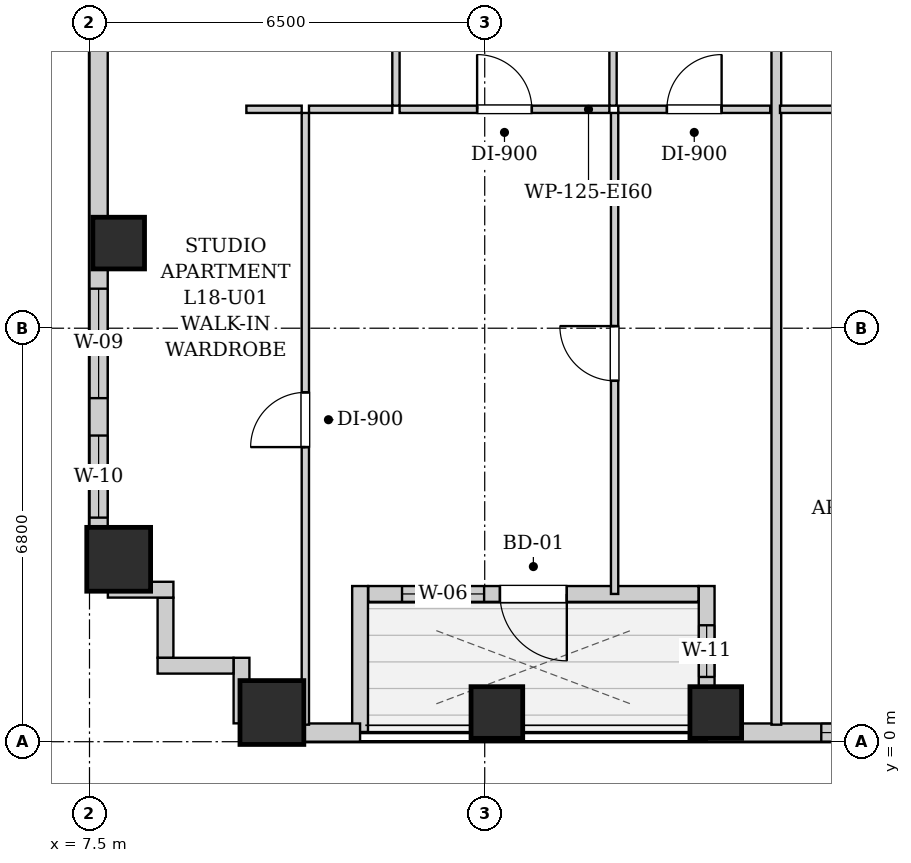
"""IFC4 building model, lengths in metres.
Left out: names, types, materials, properties, quantities, classifications, styles, units other than length and angle.
Written with IfcOpenShell. Run it as: python <this file> out.ifc"""

import sys

from ifc_helpers import new_model, si_unit, direction, frame, frame_2d, origin, origin_2d, place, context, subcontext, project, spatial, rectangle, extrude, element, fill, save


model = new_model("IFC4")
c1 = context("Model", 3, precision=1e-05, world=origin(), true_north=direction((0.0, 1.0)))
c2 = subcontext(c1, "Body", "Model", "MODEL_VIEW")
j1 = project(units=[si_unit("LENGTHUNIT", "METRE"), si_unit("PLANEANGLEUNIT", "RADIAN")], contexts=[c1])
p1 = place(None, origin())
s1 = spatial("IfcSite", under=j1, at=p1, CompositionType="ELEMENT")
p2 = place(p1, origin())
s2 = spatial("IfcBuilding", under=s1, at=p2, CompositionType="ELEMENT")
p3 = place(p2, frame((0.0, 0.0, 67.4)))
s3 = spatial("IfcBuildingStorey", under=s2, at=p3, CompositionType="ELEMENT", Elevation=67.4)
p4 = place(p3, frame((10.5, 0.48, 0.0), z_axis=(0.0, 0.0, 1.0), x_axis=(1.0, 0.0, 0.0)))
e1 = element("IfcColumn", 1, at=p4, inside=s3, PredefinedType="COLUMN", context=c2, shape_type="SweptSolid", body=[
    extrude(rectangle(XDim=1.05, YDim=1.05, at=origin_2d()), origin(), (0.0, 0.0, 1.0), 3.2),
])
for number, where, z_axis, x_axis in (
    (2, (14.2, 0.48, 0.0), (0.0, 0.0, 1.0), (1.0, 0.0, 0.0)),
    (3, (17.8, 0.48, 0.0), (0.0, 0.0, 1.0), (1.0, 0.0, 0.0)),
):
    element("IfcColumn", number, at=place(p3, frame(where, z_axis=z_axis, x_axis=x_axis)), inside=s3, PredefinedType="COLUMN", context=c2, shape_type="SweptSolid", body=[
        extrude(rectangle(XDim=0.85, YDim=0.85, at=origin_2d()), origin(), (0.0, 0.0, 1.0), 3.2),
    ])
p5 = place(p3, frame((7.98, 3.0, 0.0), z_axis=(0.0, 0.0, 1.0), x_axis=(1.0, 0.0, 0.0)))
e4 = element("IfcColumn", 4, at=p5, inside=s3, PredefinedType="COLUMN", context=c2, shape_type="SweptSolid", body=[
    extrude(rectangle(XDim=1.05, YDim=1.05, at=origin_2d()), origin(), (0.0, 0.0, 1.0), 3.2),
])
p6 = place(p3, frame((7.98, 8.2, 0.0), z_axis=(0.0, 0.0, 1.0), x_axis=(1.0, 0.0, 0.0)))
e5 = element("IfcColumn", 5, at=p6, inside=s3, PredefinedType="COLUMN", context=c2, shape_type="SweptSolid", body=[
    extrude(rectangle(XDim=0.85, YDim=0.85, at=origin_2d()), origin(), (0.0, 0.0, 1.0), 3.2),
])
p7 = place(p3, frame((44.0, 0.15, 0.0), z_axis=(0.0, 0.0, 1.0), x_axis=(-1.0, 0.0, 0.0)))
e6 = element("IfcWall", 6, at=p7, inside=s3, PredefinedType="SOLIDWALL", context=c2, shape_type="SweptSolid", body=[
    extrude(rectangle(XDim=26.35, YDim=0.3, at=frame_2d((13.175, 0.0))), origin(), (0.0, 0.0, 1.0), 1.915),
])
p8 = place(p7, frame((22.665, 0.0, 0.55)))
e7 = element("IfcOpeningElement", 7, at=p8, cuts=e6, PredefinedType="OPENING", context=c2, shape_type="SweptSolid", body=[
    extrude(rectangle(XDim=1.8, YDim=1.2, at=frame_2d((0.9, 0.6))), frame((0.0, 0.16, 0.0), z_axis=(0.0, -1.0, 0.0), x_axis=(1.0, 0.0, 0.0)), (0.0, 0.0, 1.0), 0.32),
])
p9 = place(p7, frame((15.82, 0.0, 0.55)))
e8 = element("IfcOpeningElement", 8, at=p9, cuts=e6, PredefinedType="OPENING", context=c2, shape_type="SweptSolid", body=[
    extrude(rectangle(XDim=0.68, YDim=1.2, at=frame_2d((0.34, 0.6))), frame((0.0, 0.16, 0.0), z_axis=(0.0, -1.0, 0.0), x_axis=(1.0, 0.0, 0.0)), (0.0, 0.0, 1.0), 0.32),
])
p10 = place(p7, frame((13.027, 0.0, 0.55)))
e9 = element("IfcOpeningElement", 9, at=p10, cuts=e6, PredefinedType="OPENING", context=c2, shape_type="SweptSolid", body=[
    extrude(rectangle(XDim=1.8, YDim=1.2, at=frame_2d((0.9, 0.6))), frame((0.0, 0.16, 0.0), z_axis=(0.0, -1.0, 0.0), x_axis=(1.0, 0.0, 0.0)), (0.0, 0.0, 1.0), 0.32),
])
p11 = place(p7, frame((9.365, 0.0, 0.55)))
e10 = element("IfcOpeningElement", 10, at=p11, cuts=e6, PredefinedType="OPENING", context=c2, shape_type="SweptSolid", body=[
    extrude(rectangle(XDim=0.85, YDim=1.2, at=frame_2d((0.425, 0.6))), frame((0.0, 0.16, 0.0), z_axis=(0.0, -1.0, 0.0), x_axis=(1.0, 0.0, 0.0)), (0.0, 0.0, 1.0), 0.32),
])
p12 = place(p7, frame((6.553, 0.0, 0.55)))
e11 = element("IfcOpeningElement", 11, at=p12, cuts=e6, PredefinedType="OPENING", context=c2, shape_type="SweptSolid", body=[
    extrude(rectangle(XDim=1.8, YDim=1.2, at=frame_2d((0.9, 0.6))), frame((0.0, 0.16, 0.0), z_axis=(0.0, -1.0, 0.0), x_axis=(1.0, 0.0, 0.0)), (0.0, 0.0, 1.0), 0.32),
])
p13 = place(p7, frame((2.262, 0.0, 0.55)))
e12 = element("IfcOpeningElement", 12, at=p13, cuts=e6, PredefinedType="OPENING", context=c2, shape_type="SweptSolid", body=[
    extrude(rectangle(XDim=1.8, YDim=1.2, at=frame_2d((0.9, 0.6))), frame((0.0, 0.16, 0.0), z_axis=(0.0, -1.0, 0.0), x_axis=(1.0, 0.0, 0.0)), (0.0, 0.0, 1.0), 0.32),
])
p14 = place(p3, frame((17.65, 0.16, 0.0), z_axis=(0.0, 0.0, 1.0), x_axis=(0.0, 1.0, 0.0)))
e13 = element("IfcWall", 13, at=p14, inside=s3, PredefinedType="SOLIDWALL", context=c2, shape_type="SweptSolid", body=[
    extrude(rectangle(XDim=2.4, YDim=0.26, at=frame_2d((1.2, 0.0))), origin(), (0.0, 0.0, 1.0), 2.88),
])
p15 = place(p14, frame((0.905, 0.0, 0.55)))
e14 = element("IfcOpeningElement", 14, at=p15, cuts=e13, PredefinedType="OPENING", context=c2, shape_type="SweptSolid", body=[
    extrude(rectangle(XDim=0.85, YDim=1.2, at=frame_2d((0.425, 0.6))), frame((0.0, 0.14, 0.0), z_axis=(0.0, -1.0, 0.0), x_axis=(1.0, 0.0, 0.0)), (0.0, 0.0, 1.0), 0.28),
])
p16 = place(p3, frame((17.516, 2.43, 0.0), z_axis=(0.0, 0.0, 1.0), x_axis=(-1.0, 0.0, 0.0)))
e15 = element("IfcWall", 15, at=p16, inside=s3, PredefinedType="SOLIDWALL", context=c2, shape_type="SweptSolid", body=[
    extrude(rectangle(XDim=5.432, YDim=0.26, at=frame_2d((2.716, 0.0))), origin(), (0.0, 0.0, 1.0), 2.88),
])
p17 = place(p16, frame((2.166, 0.0, 0.0)))
e16 = element("IfcOpeningElement", 16, at=p17, cuts=e15, PredefinedType="OPENING", context=c2, shape_type="SweptSolid", body=[
    extrude(rectangle(XDim=1.1, YDim=2.0, at=frame_2d((0.55, 1.0))), frame((0.0, 0.14, 0.0), z_axis=(0.0, -1.0, 0.0), x_axis=(1.0, 0.0, 0.0)), (0.0, 0.0, 1.0), 0.28),
])
p18 = place(p16, frame((3.526, 0.0, 0.85)))
e17 = element("IfcOpeningElement", 17, at=p18, cuts=e15, PredefinedType="OPENING", context=c2, shape_type="SweptSolid", body=[
    extrude(rectangle(XDim=1.35, YDim=1.65, at=frame_2d((0.675, 0.825))), frame((0.0, 0.14, 0.0), z_axis=(0.0, -1.0, 0.0), x_axis=(1.0, 0.0, 0.0)), (0.0, 0.0, 1.0), 0.28),
])
p19 = place(p3, frame((11.95, 2.56, 0.0), z_axis=(0.0, 0.0, 1.0), x_axis=(0.0, -1.0, 0.0)))
e18 = element("IfcWall", 18, at=p19, inside=s3, PredefinedType="SOLIDWALL", context=c2, shape_type="SweptSolid", body=[
    extrude(rectangle(XDim=2.4, YDim=0.26, at=frame_2d((1.2, 0.0))), origin(), (0.0, 0.0, 1.0), 2.88),
])
p20 = place(p3, frame((11.95, 0.15, 0.0), z_axis=(0.0, 0.0, 1.0), x_axis=(-1.0, 0.0, 0.0)))
e19 = element("IfcWall", 19, at=p20, inside=s3, PredefinedType="SOLIDWALL", context=c2, shape_type="SweptSolid", body=[
    extrude(rectangle(XDim=1.95, YDim=0.3, at=frame_2d((0.975, 0.0))), origin(), (0.0, 0.0, 1.0), 1.915),
])
p21 = place(p3, frame((7.65, 2.5, 0.0), z_axis=(0.0, 0.0, 1.0), x_axis=(0.0, 1.0, 0.0)))
e20 = element("IfcWall", 20, at=p21, inside=s3, PredefinedType="SOLIDWALL", context=c2, shape_type="SweptSolid", body=[
    extrude(rectangle(XDim=42.6, YDim=0.3, at=frame_2d((21.3, 0.0))), origin(), (0.0, 0.0, 1.0), 1.915),
])
p22 = place(p21, frame((3.15, 0.0, 0.55)))
e21 = element("IfcOpeningElement", 21, at=p22, cuts=e20, PredefinedType="OPENING", context=c2, shape_type="SweptSolid", body=[
    extrude(rectangle(XDim=1.8, YDim=1.2, at=frame_2d((0.9, 0.6))), frame((0.0, 0.16, 0.0), z_axis=(0.0, -1.0, 0.0), x_axis=(1.0, 0.0, 0.0)), (0.0, 0.0, 1.0), 0.32),
])
p23 = place(p21, frame((1.185, 0.0, 0.55)))
e22 = element("IfcOpeningElement", 22, at=p23, cuts=e20, PredefinedType="OPENING", context=c2, shape_type="SweptSolid", body=[
    extrude(rectangle(XDim=1.35, YDim=1.2, at=frame_2d((0.675, 0.6))), frame((0.0, 0.16, 0.0), z_axis=(0.0, -1.0, 0.0), x_axis=(1.0, 0.0, 0.0)), (0.0, 0.0, 1.0), 0.32),
])
p24 = place(p21, frame((37.085, 0.0, 0.55)))
e23 = element("IfcOpeningElement", 23, at=p24, cuts=e20, PredefinedType="OPENING", context=c2, shape_type="SweptSolid", body=[
    extrude(rectangle(XDim=1.8, YDim=1.2, at=frame_2d((0.9, 0.6))), frame((0.0, 0.16, 0.0), z_axis=(0.0, -1.0, 0.0), x_axis=(1.0, 0.0, 0.0)), (0.0, 0.0, 1.0), 0.32),
])
p25 = place(p21, frame((31.55, 0.0, 0.55)))
e24 = element("IfcOpeningElement", 24, at=p25, cuts=e20, PredefinedType="OPENING", context=c2, shape_type="SweptSolid", body=[
    extrude(rectangle(XDim=1.35, YDim=1.2, at=frame_2d((0.675, 0.6))), frame((0.0, 0.16, 0.0), z_axis=(0.0, -1.0, 0.0), x_axis=(1.0, 0.0, 0.0)), (0.0, 0.0, 1.0), 0.32),
])
p26 = place(p21, frame((15.2, 0.0, 0.55)))
e25 = element("IfcOpeningElement", 25, at=p26, cuts=e20, PredefinedType="OPENING", context=c2, shape_type="SweptSolid", body=[
    extrude(rectangle(XDim=1.8, YDim=1.2, at=frame_2d((0.9, 0.6))), frame((0.0, 0.16, 0.0), z_axis=(0.0, -1.0, 0.0), x_axis=(1.0, 0.0, 0.0)), (0.0, 0.0, 1.0), 0.32),
])
p27 = place(p21, frame((13.085, 0.0, 0.55)))
e26 = element("IfcOpeningElement", 26, at=p27, cuts=e20, PredefinedType="OPENING", context=c2, shape_type="SweptSolid", body=[
    extrude(rectangle(XDim=1.35, YDim=1.2, at=frame_2d((0.675, 0.6))), frame((0.0, 0.16, 0.0), z_axis=(0.0, -1.0, 0.0), x_axis=(1.0, 0.0, 0.0)), (0.0, 0.0, 1.0), 0.32),
])
p28 = place(p21, frame((22.575, 0.0, 0.55)))
e27 = element("IfcOpeningElement", 27, at=p28, cuts=e20, PredefinedType="OPENING", context=c2, shape_type="SweptSolid", body=[
    extrude(rectangle(XDim=1.8, YDim=1.2, at=frame_2d((0.9, 0.6))), frame((0.0, 0.16, 0.0), z_axis=(0.0, -1.0, 0.0), x_axis=(1.0, 0.0, 0.0)), (0.0, 0.0, 1.0), 0.32),
])
p29 = place(p3, frame((10.0, 0.302, 0.0), z_axis=(0.0, 0.0, 1.0), x_axis=(0.0, 1.0, 0.0)))
e28 = element("IfcWall", 28, at=p29, inside=s3, PredefinedType="SOLIDWALL", context=c2, shape_type="SweptSolid", body=[
    extrude(rectangle(XDim=1.078, YDim=0.26, at=frame_2d((0.539, 0.0))), origin(), (0.0, 0.0, 1.0), 2.88),
])
p30 = place(p3, frame((9.868, 1.25, 0.0), z_axis=(0.0, 0.0, 1.0), x_axis=(-1.0, 0.0, 0.0)))
e29 = element("IfcWall", 29, at=p30, inside=s3, PredefinedType="SOLIDWALL", context=c2, shape_type="SweptSolid", body=[
    extrude(rectangle(XDim=1.248, YDim=0.26, at=frame_2d((0.624, 0.0))), origin(), (0.0, 0.0, 1.0), 2.88),
])
p31 = place(p3, frame((8.75, 1.382, 0.0), z_axis=(0.0, 0.0, 1.0), x_axis=(0.0, 1.0, 0.0)))
e30 = element("IfcWall", 30, at=p31, inside=s3, PredefinedType="SOLIDWALL", context=c2, shape_type="SweptSolid", body=[
    extrude(rectangle(XDim=0.986, YDim=0.26, at=frame_2d((0.493, 0.0))), origin(), (0.0, 0.0, 1.0), 2.88),
])
p32 = place(p3, frame((8.88, 2.5, 0.0), z_axis=(0.0, 0.0, 1.0), x_axis=(-1.0, 0.0, 0.0)))
e31 = element("IfcWall", 31, at=p32, inside=s3, PredefinedType="SOLIDWALL", context=c2, shape_type="SweptSolid", body=[
    extrude(rectangle(XDim=1.078, YDim=0.26, at=frame_2d((0.539, 0.0))), origin(), (0.0, 0.0, 1.0), 2.88),
])
p33 = place(p3, frame((12.54, 10.46, 0.0), z_axis=(0.0, 0.0, 1.0), x_axis=(0.0, 1.0, 0.0)))
e32 = element("IfcWall", 32, at=p33, inside=s3, PredefinedType="PARTITIONING", context=c2, shape_type="SweptSolid", body=[
    extrude(rectangle(XDim=2.85, YDim=0.12, at=frame_2d((1.425, 0.0))), origin(), (0.0, 0.0, 1.0), 2.88),
])
p34 = place(p33, frame((0.995, 0.0, 0.0)))
e33 = element("IfcOpeningElement", 33, at=p34, cuts=e32, PredefinedType="OPENING", context=c2, shape_type="SweptSolid", body=[
    extrude(rectangle(XDim=0.86, YDim=2.05, at=frame_2d((0.43, 1.025))), frame((0.0, 0.07, 0.0), z_axis=(0.0, -1.0, 0.0), x_axis=(1.0, 0.0, 0.0)), (0.0, 0.0, 1.0), 0.14),
])
p35 = place(p3, frame((10.08, 10.4, 0.0), z_axis=(0.0, 0.0, 1.0), x_axis=(1.0, 0.0, 0.0)))
e34 = element("IfcWall", 34, at=p35, inside=s3, PredefinedType="PARTITIONING", context=c2, shape_type="SweptSolid", body=[
    extrude(rectangle(XDim=0.91, YDim=0.12, at=frame_2d((0.455, 0.0))), origin(), (0.0, 0.0, 1.0), 2.88),
])
p36 = place(p3, frame((11.11, 10.4, 0.0), z_axis=(0.0, 0.0, 1.0), x_axis=(1.0, 0.0, 0.0)))
e35 = element("IfcWall", 35, at=p36, inside=s3, PredefinedType="PARTITIONING", context=c2, shape_type="SweptSolid", body=[
    extrude(rectangle(XDim=1.37, YDim=0.12, at=frame_2d((0.685, 0.0))), origin(), (0.0, 0.0, 1.0), 2.88),
])
p37 = place(p3, frame((16.11, 10.46, 0.0), z_axis=(0.0, 0.0, 1.0), x_axis=(0.0, 1.0, 0.0)))
e36 = element("IfcWall", 36, at=p37, inside=s3, PredefinedType="PARTITIONING", context=c2, shape_type="SweptSolid", body=[
    extrude(rectangle(XDim=2.85, YDim=0.12, at=frame_2d((1.425, 0.0))), origin(), (0.0, 0.0, 1.0), 2.88),
])
p38 = place(p37, frame((0.975, 0.0, 0.0)))
e37 = element("IfcOpeningElement", 37, at=p38, cuts=e36, PredefinedType="OPENING", context=c2, shape_type="SweptSolid", body=[
    extrude(rectangle(XDim=0.9, YDim=2.05, at=frame_2d((0.45, 1.025))), frame((0.0, 0.07, 0.0), z_axis=(0.0, -1.0, 0.0), x_axis=(1.0, 0.0, 0.0)), (0.0, 0.0, 1.0), 0.14),
])
p39 = place(p3, frame((12.6, 10.4, 0.0), z_axis=(0.0, 0.0, 1.0), x_axis=(1.0, 0.0, 0.0)))
e38 = element("IfcWall", 38, at=p39, inside=s3, PredefinedType="PARTITIONING", context=c2, shape_type="SweptSolid", body=[
    extrude(rectangle(XDim=3.45, YDim=0.12, at=frame_2d((1.725, 0.0))), origin(), (0.0, 0.0, 1.0), 2.88),
])
p40 = place(p39, frame((1.275, 0.0, 0.0)))
e39 = element("IfcOpeningElement", 39, at=p40, cuts=e38, PredefinedType="OPENING", context=c2, shape_type="SweptSolid", body=[
    extrude(rectangle(XDim=0.9, YDim=2.05, at=frame_2d((0.45, 1.025))), frame((0.0, 0.07, 0.0), z_axis=(0.0, -1.0, 0.0), x_axis=(1.0, 0.0, 0.0)), (0.0, 0.0, 1.0), 0.14),
])
p41 = place(p3, frame((16.196, 10.4, 0.0), z_axis=(0.0, 0.0, 1.0), x_axis=(1.0, 0.0, 0.0)))
e40 = element("IfcWall", 40, at=p41, inside=s3, PredefinedType="PARTITIONING", context=c2, shape_type="SweptSolid", body=[
    extrude(rectangle(XDim=2.5, YDim=0.12, at=frame_2d((1.25, 0.0))), origin(), (0.0, 0.0, 1.0), 2.88),
])
p42 = place(p41, frame((0.8, 0.0, 0.0)))
e41 = element("IfcOpeningElement", 41, at=p42, cuts=e40, PredefinedType="OPENING", context=c2, shape_type="SweptSolid", body=[
    extrude(rectangle(XDim=0.9, YDim=2.05, at=frame_2d((0.45, 1.025))), frame((0.0, 0.07, 0.0), z_axis=(0.0, -1.0, 0.0), x_axis=(1.0, 0.0, 0.0)), (0.0, 0.0, 1.0), 0.14),
])
p43 = place(p3, frame((11.05, 0.28, 0.0), z_axis=(0.0, 0.0, 1.0), x_axis=(0.0, 1.0, 0.0)))
e42 = element("IfcWall", 42, at=p43, inside=s3, PredefinedType="PARTITIONING", context=c2, shape_type="SweptSolid", body=[
    extrude(rectangle(XDim=10.06, YDim=0.12, at=frame_2d((5.03, 0.0))), origin(), (0.0, 0.0, 1.0), 2.88),
])
p44 = place(p43, frame((4.565, 0.0, 0.0)))
e43 = element("IfcOpeningElement", 43, at=p44, cuts=e42, PredefinedType="OPENING", context=c2, shape_type="SweptSolid", body=[
    extrude(rectangle(XDim=0.9, YDim=2.05, at=frame_2d((0.45, 1.025))), frame((0.0, 0.07, 0.0), z_axis=(0.0, -1.0, 0.0), x_axis=(1.0, 0.0, 0.0)), (0.0, 0.0, 1.0), 0.14),
])
p45 = place(p3, frame((16.136, 2.43, 0.0), z_axis=(0.0, 0.0, 1.0), x_axis=(0.0, 1.0, 0.0)))
e44 = element("IfcWall", 44, at=p45, inside=s3, PredefinedType="PARTITIONING", context=c2, shape_type="SweptSolid", body=[
    extrude(rectangle(XDim=7.91, YDim=0.12, at=frame_2d((3.955, 0.0))), origin(), (0.0, 0.0, 1.0), 2.88),
])
p46 = place(p45, frame((3.505, 0.0, 0.0)))
e45 = element("IfcOpeningElement", 45, at=p46, cuts=e44, PredefinedType="OPENING", context=c2, shape_type="SweptSolid", body=[
    extrude(rectangle(XDim=0.9, YDim=2.05, at=frame_2d((0.45, 1.025))), frame((0.0, 0.07, 0.0), z_axis=(0.0, -1.0, 0.0), x_axis=(1.0, 0.0, 0.0)), (0.0, 0.0, 1.0), 0.14),
])
p47 = place(p3, frame((18.796, 0.28, 0.0), z_axis=(0.0, 0.0, 1.0), x_axis=(0.0, 1.0, 0.0)))
e46 = element("IfcWall", 46, at=p47, inside=s3, PredefinedType="PARTITIONING", context=c2, shape_type="SweptSolid", body=[
    extrude(rectangle(XDim=13.03, YDim=0.16, at=frame_2d((6.515, 0.0))), origin(), (0.0, 0.0, 1.0), 2.88),
])
p48 = place(p3, frame((18.856, 10.4, 0.0), z_axis=(0.0, 0.0, 1.0), x_axis=(1.0, 0.0, 0.0)))
e47 = element("IfcWall", 47, at=p48, inside=s3, PredefinedType="PARTITIONING", context=c2, shape_type="SweptSolid", body=[
    extrude(rectangle(XDim=2.4, YDim=0.12, at=frame_2d((1.2, 0.0))), origin(), (0.0, 0.0, 1.0), 2.88),
])
p49 = place(p40, origin())
e48 = element("IfcDoor", 48, at=p49, inside=s3, OperationType="SINGLE_SWING_LEFT", PredefinedType="DOOR", context=c2, shape_type="SweptSolid", body=[
    extrude(rectangle(XDim=0.9, YDim=2.05, at=frame_2d((0.45, 1.025))), frame((0.0, 0.025, 0.0), z_axis=(0.0, -1.0, 0.0), x_axis=(1.0, 0.0, 0.0)), (0.0, 0.0, 1.0), 0.05),
])
fill(e39, e48)
p50 = place(p42, origin())
e49 = element("IfcDoor", 49, at=p50, inside=s3, OperationType="SINGLE_SWING_RIGHT", PredefinedType="DOOR", context=c2, shape_type="SweptSolid", body=[
    extrude(rectangle(XDim=0.9, YDim=2.05, at=frame_2d((0.45, 1.025))), frame((0.0, 0.025, 0.0), z_axis=(0.0, -1.0, 0.0), x_axis=(1.0, 0.0, 0.0)), (0.0, 0.0, 1.0), 0.05),
])
fill(e41, e49)
p51 = place(p44, origin())
e50 = element("IfcDoor", 50, at=p51, inside=s3, OperationType="SINGLE_SWING_LEFT", PredefinedType="DOOR", context=c2, shape_type="SweptSolid", body=[
    extrude(rectangle(XDim=0.9, YDim=2.05, at=frame_2d((0.45, 1.025))), frame((0.0, 0.025, 0.0), z_axis=(0.0, -1.0, 0.0), x_axis=(1.0, 0.0, 0.0)), (0.0, 0.0, 1.0), 0.05),
])
fill(e43, e50)
p52 = place(p46, origin())
e51 = element("IfcDoor", 51, at=p52, inside=s3, OperationType="SINGLE_SWING_RIGHT", PredefinedType="DOOR", context=c2, shape_type="SweptSolid", body=[
    extrude(rectangle(XDim=0.9, YDim=2.05, at=frame_2d((0.45, 1.025))), frame((0.0, 0.025, 0.0), z_axis=(0.0, -1.0, 0.0), x_axis=(1.0, 0.0, 0.0)), (0.0, 0.0, 1.0), 0.05),
])
fill(e45, e51)
p53 = place(p17, origin())
e52 = element("IfcDoor", 52, at=p53, inside=s3, OperationType="SINGLE_SWING_LEFT", PredefinedType="DOOR", context=c2, shape_type="SweptSolid", body=[
    extrude(rectangle(XDim=1.1, YDim=2.0, at=frame_2d((0.55, 1.0))), frame((0.0, 0.025, 0.0), z_axis=(0.0, -1.0, 0.0), x_axis=(1.0, 0.0, 0.0)), (0.0, 0.0, 1.0), 0.05),
])
fill(e16, e52)
p54 = place(p22, origin())
e53 = element("IfcWindow", 53, at=p54, inside=s3, PartitioningType="DOUBLE_PANEL_VERTICAL", PredefinedType="WINDOW", context=c2, shape_type="SweptSolid", body=[
    extrude(rectangle(XDim=1.8, YDim=1.2, at=frame_2d((0.9, 0.6))), frame((0.0, 0.03, 0.0), z_axis=(0.0, -1.0, 0.0), x_axis=(1.0, 0.0, 0.0)), (0.0, 0.0, 1.0), 0.06),
])
fill(e21, e53)
p55 = place(p23, origin())
e54 = element("IfcWindow", 54, at=p55, inside=s3, PartitioningType="SINGLE_PANEL", PredefinedType="WINDOW", context=c2, shape_type="SweptSolid", body=[
    extrude(rectangle(XDim=1.35, YDim=1.2, at=frame_2d((0.675, 0.6))), frame((0.0, 0.03, 0.0), z_axis=(0.0, -1.0, 0.0), x_axis=(1.0, 0.0, 0.0)), (0.0, 0.0, 1.0), 0.06),
])
fill(e22, e54)
p56 = place(p18, origin())
e55 = element("IfcWindow", 55, at=p56, inside=s3, PartitioningType="SINGLE_PANEL", PredefinedType="WINDOW", context=c2, shape_type="SweptSolid", body=[
    extrude(rectangle(XDim=1.35, YDim=1.65, at=frame_2d((0.675, 0.825))), frame((0.0, 0.03, 0.0), z_axis=(0.0, -1.0, 0.0), x_axis=(1.0, 0.0, 0.0)), (0.0, 0.0, 1.0), 0.06),
])
fill(e17, e55)
p57 = place(p15, origin())
e56 = element("IfcWindow", 56, at=p57, inside=s3, PartitioningType="SINGLE_PANEL", PredefinedType="WINDOW", context=c2, shape_type="SweptSolid", body=[
    extrude(rectangle(XDim=0.85, YDim=1.2, at=frame_2d((0.425, 0.6))), frame((0.0, 0.03, 0.0), z_axis=(0.0, -1.0, 0.0), x_axis=(1.0, 0.0, 0.0)), (0.0, 0.0, 1.0), 0.06),
])
fill(e14, e56)
p58 = place(p8, origin())
e57 = element("IfcWindow", 57, at=p58, inside=s3, PartitioningType="DOUBLE_PANEL_VERTICAL", PredefinedType="WINDOW", context=c2, shape_type="SweptSolid", body=[
    extrude(rectangle(XDim=1.8, YDim=1.2, at=frame_2d((0.9, 0.6))), frame((0.0, 0.03, 0.0), z_axis=(0.0, -1.0, 0.0), x_axis=(1.0, 0.0, 0.0)), (0.0, 0.0, 1.0), 0.06),
])
fill(e7, e57)
save(model, sys.argv[1])
